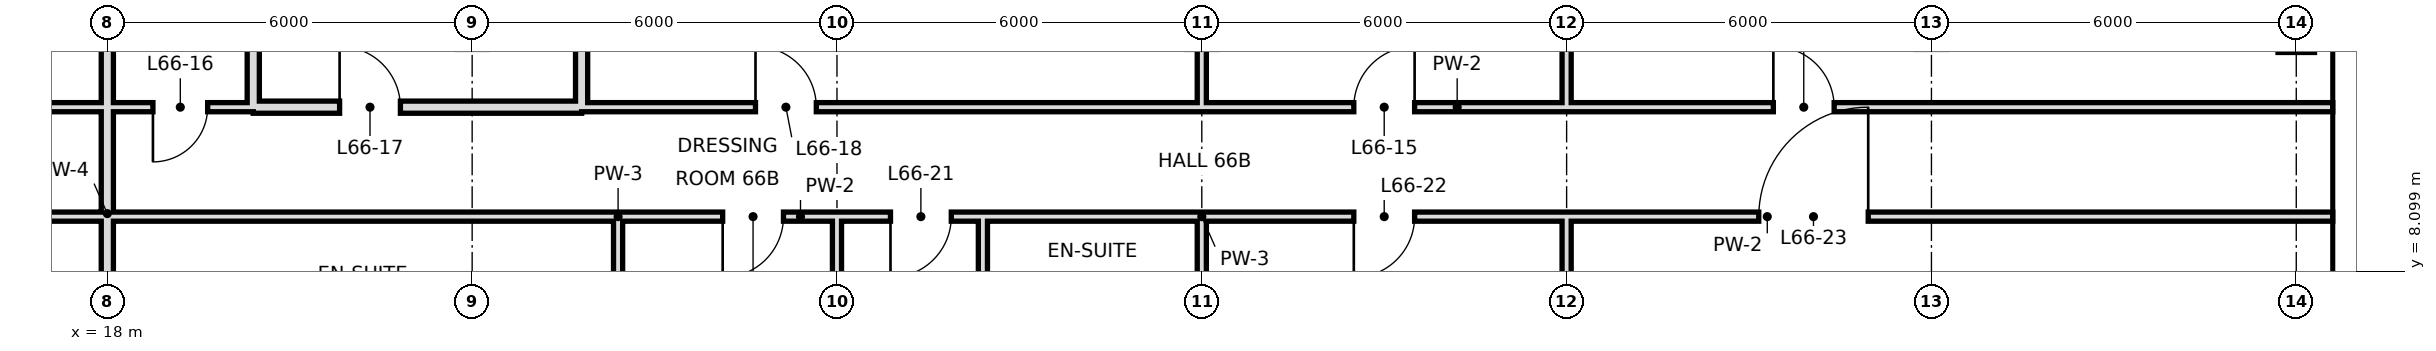
"""IFC4 building model, lengths in metres.
Left out: names, types, materials, properties, quantities, classifications, styles, units other than length and angle.
Written with IfcOpenShell. Run it as: python <this file> out.ifc"""

import sys

from ifc_helpers import new_model, si_unit, direction, frame, frame_2d, origin, place, context, subcontext, project, spatial, rectangle, extrude, element, fill, save


model = new_model("IFC4")
c1 = context("Model", 3, precision=1e-05, world=origin(), true_north=direction((0.0, 1.0)))
c2 = subcontext(c1, "Body", "Model", "MODEL_VIEW")
j1 = project(units=[si_unit("LENGTHUNIT", "METRE"), si_unit("PLANEANGLEUNIT", "RADIAN")], contexts=[c1])
p1 = place(None, origin())
s1 = spatial("IfcSite", under=j1, at=p1, CompositionType="ELEMENT")
p2 = place(p1, origin())
s2 = spatial("IfcBuilding", under=s1, at=p2, CompositionType="ELEMENT")
p3 = place(p2, frame((0.0, 0.0, 277.4)))
s3 = spatial("IfcBuildingStorey", under=s2, at=p3, CompositionType="ELEMENT", Elevation=277.4)
p4 = place(p3, frame((18.0, -0.6, 0.0), z_axis=(0.0, 0.0, 1.0), x_axis=(0.0, 1.0, 0.0)))
e1 = element("IfcWall", 1, at=p4, inside=s3, PredefinedType="SOLIDWALL", context=c2, shape_type="SweptSolid", body=[
    extrude(rectangle(XDim=19.3, YDim=0.2, at=frame_2d((9.65, 0.0))), origin(), (0.0, 0.0, 1.0), 3.4),
])
for number, where, z_axis, x_axis in (
    (2, (20.4, 10.8, 0.0), (0.0, 0.0, 1.0), (0.0, 1.0, 0.0)),
    (3, (25.8, 10.8, 0.0), (0.0, 0.0, 1.0), (0.0, 1.0, 0.0)),
):
    element("IfcWall", number, at=place(p3, frame(where, z_axis=z_axis, x_axis=x_axis)), inside=s3, PredefinedType="SOLIDWALL", context=c2, shape_type="SweptSolid", body=[
        extrude(rectangle(XDim=7.9, YDim=0.2, at=frame_2d((3.95, 0.0))), origin(), (0.0, 0.0, 1.0), 3.4),
    ])
p5 = place(p3, frame((26.4, 6.0, 0.0), z_axis=(0.0, 0.0, 1.0), x_axis=(0.0, 1.0, 0.0)))
e4 = element("IfcWall", 4, at=p5, inside=s3, PredefinedType="PARTITIONING", context=c2, shape_type="SweptSolid", body=[
    extrude(rectangle(XDim=3.0, YDim=0.15, at=frame_2d((1.5, 0.0))), origin(), (0.0, 0.0, 1.0), 4.1),
])
p6 = place(p3, frame((30.0, -0.6, 0.0), z_axis=(0.0, 0.0, 1.0), x_axis=(0.0, 1.0, 0.0)))
e5 = element("IfcWall", 5, at=p6, inside=s3, PredefinedType="PARTITIONING", context=c2, shape_type="SweptSolid", body=[
    extrude(rectangle(XDim=9.6, YDim=0.15, at=frame_2d((4.8, 0.0))), origin(), (0.0, 0.0, 1.0), 3.4),
])
p7 = place(p3, frame((32.4, 6.0, 0.0), z_axis=(0.0, 0.0, 1.0), x_axis=(0.0, 1.0, 0.0)))
e6 = element("IfcWall", 6, at=p7, inside=s3, PredefinedType="PARTITIONING", context=c2, shape_type="SweptSolid", body=[
    extrude(rectangle(XDim=3.0, YDim=0.15, at=frame_2d((1.5, 0.0))), origin(), (0.0, 0.0, 1.0), 4.1),
])
p8 = place(p3, frame((36.0, 10.8, 0.0), z_axis=(0.0, 0.0, 1.0), x_axis=(0.0, 1.0, 0.0)))
e7 = element("IfcWall", 7, at=p8, inside=s3, PredefinedType="PARTITIONING", context=c2, shape_type="SweptSolid", body=[
    extrude(rectangle(XDim=7.9, YDim=0.15, at=frame_2d((3.95, 0.0))), origin(), (0.0, 0.0, 1.0), 3.4),
])
p9 = place(p3, frame((36.0, 6.0, 0.0), z_axis=(0.0, 0.0, 1.0), x_axis=(0.0, 1.0, 0.0)))
e8 = element("IfcWall", 8, at=p9, inside=s3, PredefinedType="PARTITIONING", context=c2, shape_type="SweptSolid", body=[
    extrude(rectangle(XDim=3.0, YDim=0.15, at=frame_2d((1.5, 0.0))), origin(), (0.0, 0.0, 1.0), 3.4),
])
p10 = place(p3, frame((42.0, -0.6, 0.0), z_axis=(0.0, 0.0, 1.0), x_axis=(0.0, 1.0, 0.0)))
e9 = element("IfcWall", 9, at=p10, inside=s3, PredefinedType="PARTITIONING", context=c2, shape_type="SweptSolid", body=[
    extrude(rectangle(XDim=9.6, YDim=0.15, at=frame_2d((4.8, 0.0))), origin(), (0.0, 0.0, 1.0), 4.1),
])
p11 = place(p3, frame((42.0, 10.8, 0.0), z_axis=(0.0, 0.0, 1.0), x_axis=(0.0, 1.0, 0.0)))
e10 = element("IfcWall", 10, at=p11, inside=s3, PredefinedType="PARTITIONING", context=c2, shape_type="SweptSolid", body=[
    extrude(rectangle(XDim=7.9, YDim=0.15, at=frame_2d((3.95, 0.0))), origin(), (0.0, 0.0, 1.0), 3.4),
])
p12 = place(p3, frame((20.4, 10.8, 0.0), z_axis=(0.0, 0.0, 1.0), x_axis=(1.0, 0.0, 0.0)))
e11 = element("IfcWall", 11, at=p12, inside=s3, PredefinedType="SOLIDWALL", context=c2, shape_type="SweptSolid", body=[
    extrude(rectangle(XDim=5.4, YDim=0.2, at=frame_2d((2.7, 0.0))), origin(), (0.0, 0.0, 1.0), 3.4),
])
p13 = place(p12, frame((1.42, 0.0, 0.0)))
e12 = element("IfcOpeningElement", 12, at=p13, cuts=e11, PredefinedType="OPENING", context=c2, shape_type="SweptSolid", body=[
    extrude(rectangle(XDim=1.0, YDim=2.4, at=frame_2d((0.5, 1.2))), frame((0.0, 0.11, 0.0), z_axis=(0.0, -1.0, 0.0), x_axis=(1.0, 0.0, 0.0)), (0.0, 0.0, 1.0), 0.22),
])
p14 = place(p3, frame((12.0, 10.8, 0.0), z_axis=(0.0, 0.0, 1.0), x_axis=(1.0, 0.0, 0.0)))
e13 = element("IfcWall", 13, at=p14, inside=s3, PredefinedType="PARTITIONING", context=c2, shape_type="SweptSolid", body=[
    extrude(rectangle(XDim=6.0, YDim=0.15, at=frame_2d((3.0, 0.0))), origin(), (0.0, 0.0, 1.0), 4.1),
])
p15 = place(p14, frame((1.6, 0.0, 0.0)))
e14 = element("IfcOpeningElement", 14, at=p15, cuts=e13, PredefinedType="OPENING", context=c2, shape_type="SweptSolid", body=[
    extrude(rectangle(XDim=1.0, YDim=2.4, at=frame_2d((0.5, 1.2))), frame((0.0, 0.085, 0.0), z_axis=(0.0, -1.0, 0.0), x_axis=(1.0, 0.0, 0.0)), (0.0, 0.0, 1.0), 0.17),
])
p16 = place(p3, frame((25.8, 10.8, 0.0), z_axis=(0.0, 0.0, 1.0), x_axis=(1.0, 0.0, 0.0)))
e15 = element("IfcWall", 15, at=p16, inside=s3, PredefinedType="PARTITIONING", context=c2, shape_type="SweptSolid", body=[
    extrude(rectangle(XDim=28.8, YDim=0.15, at=frame_2d((14.4, 0.0))), origin(), (0.0, 0.0, 1.0), 4.1),
])
p17 = place(p16, frame((12.7, 0.0, 0.0)))
e16 = element("IfcOpeningElement", 16, at=p17, cuts=e15, PredefinedType="OPENING", context=c2, shape_type="SweptSolid", body=[
    extrude(rectangle(XDim=1.0, YDim=2.4, at=frame_2d((0.5, 1.2))), frame((0.0, 0.085, 0.0), z_axis=(0.0, -1.0, 0.0), x_axis=(1.0, 0.0, 0.0)), (0.0, 0.0, 1.0), 0.17),
])
p18 = place(p16, frame((2.86, 0.0, 0.0)))
e17 = element("IfcOpeningElement", 17, at=p18, cuts=e15, PredefinedType="OPENING", context=c2, shape_type="SweptSolid", body=[
    extrude(rectangle(XDim=1.0, YDim=2.4, at=frame_2d((0.5, 1.2))), frame((0.0, 0.085, 0.0), z_axis=(0.0, -1.0, 0.0), x_axis=(1.0, 0.0, 0.0)), (0.0, 0.0, 1.0), 0.17),
])
p19 = place(p16, frame((19.6, 0.0, 0.0)))
e18 = element("IfcOpeningElement", 18, at=p19, cuts=e15, PredefinedType="OPENING", context=c2, shape_type="SweptSolid", body=[
    extrude(rectangle(XDim=1.0, YDim=2.4, at=frame_2d((0.5, 1.2))), frame((0.0, 0.085, 0.0), z_axis=(0.0, -1.0, 0.0), x_axis=(1.0, 0.0, 0.0)), (0.0, 0.0, 1.0), 0.17),
])
p20 = place(p3, frame((18.0, 10.8, 0.0), z_axis=(0.0, 0.0, 1.0), x_axis=(1.0, 0.0, 0.0)))
e19 = element("IfcWall", 19, at=p20, inside=s3, PredefinedType="PARTITIONING", context=c2, shape_type="SweptSolid", body=[
    extrude(rectangle(XDim=2.4, YDim=0.15, at=frame_2d((1.2, 0.0))), origin(), (0.0, 0.0, 1.0), 4.1),
])
p21 = place(p20, frame((0.75, 0.0, 0.0)))
e20 = element("IfcOpeningElement", 20, at=p21, cuts=e19, PredefinedType="OPENING", context=c2, shape_type="SweptSolid", body=[
    extrude(rectangle(XDim=0.9, YDim=2.4, at=frame_2d((0.45, 1.2))), frame((0.0, 0.085, 0.0), z_axis=(0.0, -1.0, 0.0), x_axis=(1.0, 0.0, 0.0)), (0.0, 0.0, 1.0), 0.17),
])
p22 = place(p3, frame((26.4, 9.0, 0.0), z_axis=(0.0, 0.0, 1.0), x_axis=(1.0, 0.0, 0.0)))
e21 = element("IfcWall", 21, at=p22, inside=s3, PredefinedType="PARTITIONING", context=c2, shape_type="SweptSolid", body=[
    extrude(rectangle(XDim=6.0, YDim=0.15, at=frame_2d((3.0, 0.0))), origin(), (0.0, 0.0, 1.0), 4.1),
])
p23 = place(p22, frame((1.72, 0.0, 0.0)))
e22 = element("IfcOpeningElement", 22, at=p23, cuts=e21, PredefinedType="OPENING", context=c2, shape_type="SweptSolid", body=[
    extrude(rectangle(XDim=1.0, YDim=2.4, at=frame_2d((0.5, 1.2))), frame((0.0, 0.085, 0.0), z_axis=(0.0, -1.0, 0.0), x_axis=(1.0, 0.0, 0.0)), (0.0, 0.0, 1.0), 0.17),
])
p24 = place(p22, frame((4.48, 0.0, 0.0)))
e23 = element("IfcOpeningElement", 23, at=p24, cuts=e21, PredefinedType="OPENING", context=c2, shape_type="SweptSolid", body=[
    extrude(rectangle(XDim=1.0, YDim=2.4, at=frame_2d((0.5, 1.2))), frame((0.0, 0.085, 0.0), z_axis=(0.0, -1.0, 0.0), x_axis=(1.0, 0.0, 0.0)), (0.0, 0.0, 1.0), 0.17),
])
p25 = place(p3, frame((36.0, 9.0, 0.0), z_axis=(0.0, 0.0, 1.0), x_axis=(1.0, 0.0, 0.0)))
e24 = element("IfcWall", 24, at=p25, inside=s3, PredefinedType="PARTITIONING", context=c2, shape_type="SweptSolid", body=[
    extrude(rectangle(XDim=18.6, YDim=0.15, at=frame_2d((9.3, 0.0))), origin(), (0.0, 0.0, 1.0), 4.1),
])
p26 = place(p25, frame((2.5, 0.0, 0.0)))
e25 = element("IfcOpeningElement", 25, at=p26, cuts=e24, PredefinedType="OPENING", context=c2, shape_type="SweptSolid", body=[
    extrude(rectangle(XDim=1.0, YDim=2.4, at=frame_2d((0.5, 1.2))), frame((0.0, 0.085, 0.0), z_axis=(0.0, -1.0, 0.0), x_axis=(1.0, 0.0, 0.0)), (0.0, 0.0, 1.0), 0.17),
])
p27 = place(p25, frame((9.16, 0.0, 0.0)))
e26 = element("IfcOpeningElement", 26, at=p27, cuts=e24, PredefinedType="OPENING", context=c2, shape_type="SweptSolid", body=[
    extrude(rectangle(XDim=1.8, YDim=2.4, at=frame_2d((0.9, 1.2))), frame((0.0, 0.085, 0.0), z_axis=(0.0, -1.0, 0.0), x_axis=(1.0, 0.0, 0.0)), (0.0, 0.0, 1.0), 0.17),
])
p28 = place(p3, frame((9.6, 9.0, 0.0), z_axis=(0.0, 0.0, 1.0), x_axis=(1.0, 0.0, 0.0)))
e27 = element("IfcWall", 27, at=p28, inside=s3, PredefinedType="PARTITIONING", context=c2, shape_type="SweptSolid", body=[
    extrude(rectangle(XDim=16.8, YDim=0.15, at=frame_2d((8.4, 0.0))), origin(), (0.0, 0.0, 1.0), 4.1),
])
p29 = place(p3, frame((32.4, 9.0, 0.0), z_axis=(0.0, 0.0, 1.0), x_axis=(1.0, 0.0, 0.0)))
e28 = element("IfcWall", 28, at=p29, inside=s3, PredefinedType="PARTITIONING", context=c2, shape_type="SweptSolid", body=[
    extrude(rectangle(XDim=3.6, YDim=0.15, at=frame_2d((1.8, 0.0))), origin(), (0.0, 0.0, 1.0), 4.1),
])
p30 = place(p17, frame((1.0, 0.0, 0.0), z_axis=(0.0, 0.0, 1.0), x_axis=(-1.0, 0.0, 0.0)))
e29 = element("IfcDoor", 29, at=p30, inside=s3, OperationType="SINGLE_SWING_LEFT", PredefinedType="DOOR", context=c2, shape_type="SweptSolid", body=[
    extrude(rectangle(XDim=1.0, YDim=2.4, at=frame_2d((0.5, 1.2))), frame((0.0, 0.025, 0.0), z_axis=(0.0, -1.0, 0.0), x_axis=(1.0, 0.0, 0.0)), (0.0, 0.0, 1.0), 0.05),
])
fill(e16, e29)
p31 = place(p21, frame((0.9, 0.0, 0.0), z_axis=(0.0, 0.0, 1.0), x_axis=(-1.0, 0.0, 0.0)))
e30 = element("IfcDoor", 30, at=p31, inside=s3, OperationType="SINGLE_SWING_RIGHT", PredefinedType="DOOR", context=c2, shape_type="SweptSolid", body=[
    extrude(rectangle(XDim=0.9, YDim=2.4, at=frame_2d((0.45, 1.2))), frame((0.0, 0.025, 0.0), z_axis=(0.0, -1.0, 0.0), x_axis=(1.0, 0.0, 0.0)), (0.0, 0.0, 1.0), 0.05),
])
fill(e20, e30)
p32 = place(p13, origin())
e31 = element("IfcDoor", 31, at=p32, inside=s3, OperationType="SINGLE_SWING_LEFT", PredefinedType="DOOR", context=c2, shape_type="SweptSolid", body=[
    extrude(rectangle(XDim=1.0, YDim=2.4, at=frame_2d((0.5, 1.2))), frame((0.0, 0.025, 0.0), z_axis=(0.0, -1.0, 0.0), x_axis=(1.0, 0.0, 0.0)), (0.0, 0.0, 1.0), 0.05),
])
fill(e12, e31)
p33 = place(p18, origin())
e32 = element("IfcDoor", 32, at=p33, inside=s3, OperationType="SINGLE_SWING_LEFT", PredefinedType="DOOR", context=c2, shape_type="SweptSolid", body=[
    extrude(rectangle(XDim=1.0, YDim=2.4, at=frame_2d((0.5, 1.2))), frame((0.0, 0.025, 0.0), z_axis=(0.0, -1.0, 0.0), x_axis=(1.0, 0.0, 0.0)), (0.0, 0.0, 1.0), 0.05),
])
fill(e17, e32)
p34 = place(p19, origin())
e33 = element("IfcDoor", 33, at=p34, inside=s3, OperationType="SINGLE_SWING_LEFT", PredefinedType="DOOR", context=c2, shape_type="SweptSolid", body=[
    extrude(rectangle(XDim=1.0, YDim=2.4, at=frame_2d((0.5, 1.2))), frame((0.0, 0.025, 0.0), z_axis=(0.0, -1.0, 0.0), x_axis=(1.0, 0.0, 0.0)), (0.0, 0.0, 1.0), 0.05),
])
fill(e18, e33)
p35 = place(p23, frame((1.0, 0.0, 0.0), z_axis=(0.0, 0.0, 1.0), x_axis=(-1.0, 0.0, 0.0)))
e34 = element("IfcDoor", 34, at=p35, inside=s3, OperationType="SINGLE_SWING_RIGHT", PredefinedType="DOOR", context=c2, shape_type="SweptSolid", body=[
    extrude(rectangle(XDim=1.0, YDim=2.4, at=frame_2d((0.5, 1.2))), frame((0.0, 0.025, 0.0), z_axis=(0.0, -1.0, 0.0), x_axis=(1.0, 0.0, 0.0)), (0.0, 0.0, 1.0), 0.05),
])
fill(e22, e34)
p36 = place(p24, frame((1.0, 0.0, 0.0), z_axis=(0.0, 0.0, 1.0), x_axis=(-1.0, 0.0, 0.0)))
e35 = element("IfcDoor", 35, at=p36, inside=s3, OperationType="SINGLE_SWING_RIGHT", PredefinedType="DOOR", context=c2, shape_type="SweptSolid", body=[
    extrude(rectangle(XDim=1.0, YDim=2.4, at=frame_2d((0.5, 1.2))), frame((0.0, 0.025, 0.0), z_axis=(0.0, -1.0, 0.0), x_axis=(1.0, 0.0, 0.0)), (0.0, 0.0, 1.0), 0.05),
])
fill(e23, e35)
p37 = place(p26, frame((1.0, 0.0, 0.0), z_axis=(0.0, 0.0, 1.0), x_axis=(-1.0, 0.0, 0.0)))
e36 = element("IfcDoor", 36, at=p37, inside=s3, OperationType="SINGLE_SWING_RIGHT", PredefinedType="DOOR", context=c2, shape_type="SweptSolid", body=[
    extrude(rectangle(XDim=1.0, YDim=2.4, at=frame_2d((0.5, 1.2))), frame((0.0, 0.025, 0.0), z_axis=(0.0, -1.0, 0.0), x_axis=(1.0, 0.0, 0.0)), (0.0, 0.0, 1.0), 0.05),
])
fill(e25, e36)
p38 = place(p27, frame((1.8, 0.0, 0.0), z_axis=(0.0, 0.0, 1.0), x_axis=(-1.0, 0.0, 0.0)))
e37 = element("IfcDoor", 37, at=p38, inside=s3, OperationType="SINGLE_SWING_LEFT", PredefinedType="DOOR", context=c2, shape_type="SweptSolid", body=[
    extrude(rectangle(XDim=1.8, YDim=2.4, at=frame_2d((0.9, 1.2))), frame((0.0, 0.025, 0.0), z_axis=(0.0, -1.0, 0.0), x_axis=(1.0, 0.0, 0.0)), (0.0, 0.0, 1.0), 0.05),
])
fill(e26, e37)
save(model, sys.argv[1])
